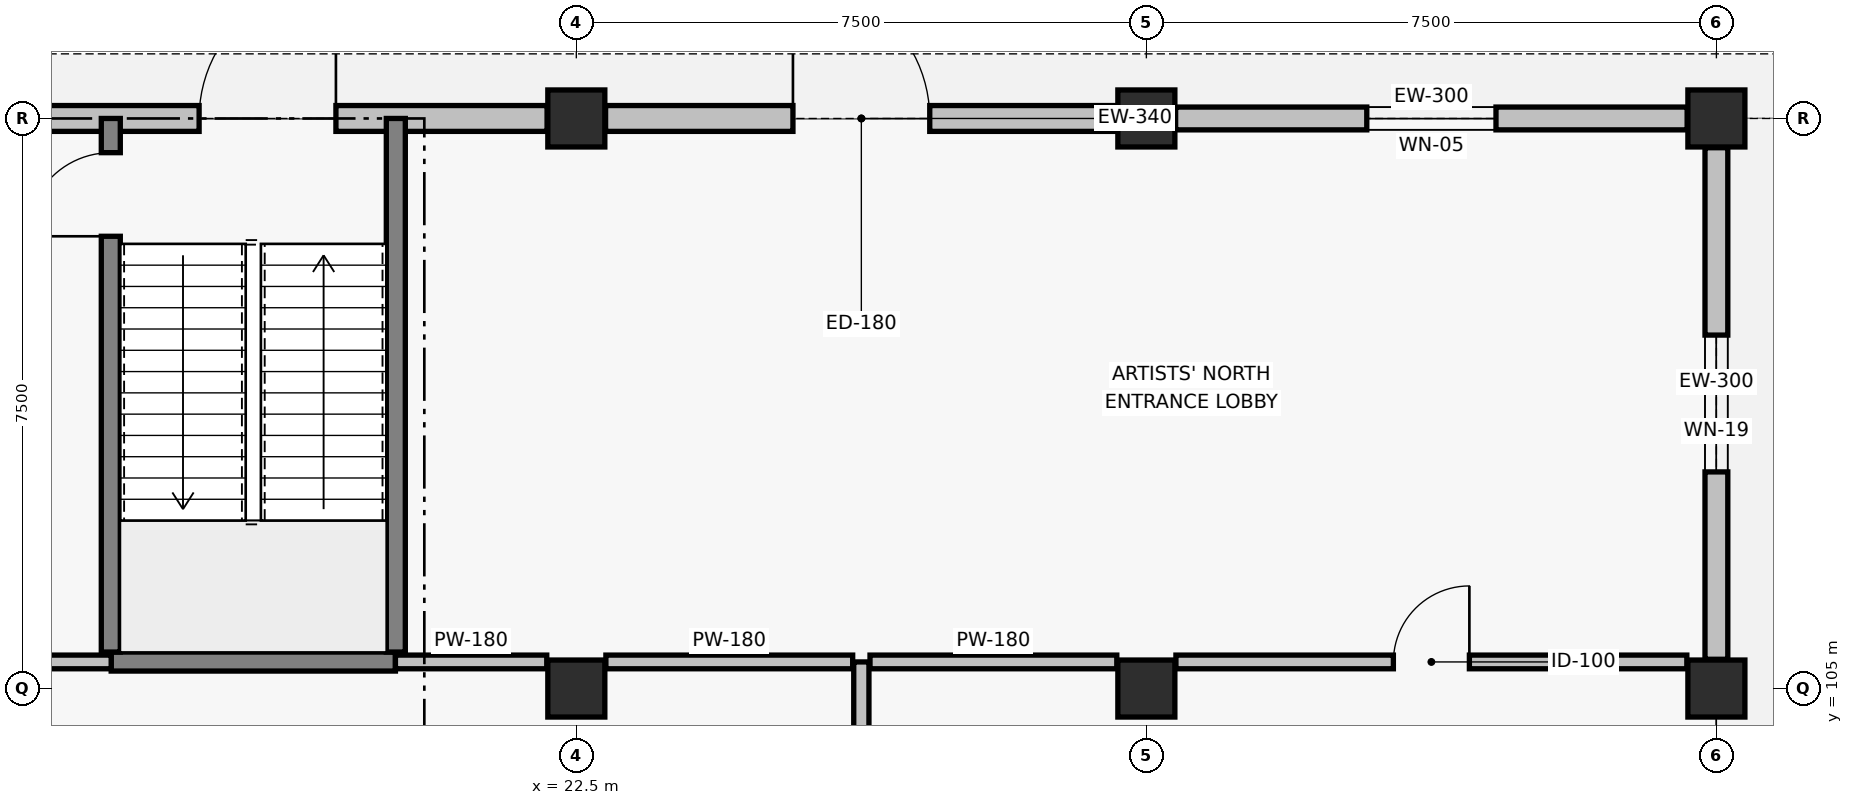
"""IFC4 building model, lengths in metres.
Left out: names, types, materials, properties, quantities, classifications, styles, units other than length and angle.
Written with IfcOpenShell. Run it as: python <this file> out.ifc"""

import sys

from ifc_helpers import new_model, si_unit, direction, frame, frame_2d, origin, origin_2d, place, context, subcontext, project, spatial, rectangle, extrude, element, fill, save


model = new_model("IFC4")
c1 = context("Model", 3, precision=1e-05, world=origin(), true_north=direction((0.0, 1.0)))
c2 = subcontext(c1, "Body", "Model", "MODEL_VIEW")
j1 = project(units=[si_unit("LENGTHUNIT", "METRE"), si_unit("PLANEANGLEUNIT", "RADIAN")], contexts=[c1])
p1 = place(None, origin())
s1 = spatial("IfcSite", under=j1, at=p1, CompositionType="ELEMENT")
p2 = place(p1, origin())
s2 = spatial("IfcBuilding", under=s1, at=p2, CompositionType="ELEMENT")
p3 = place(p2, origin())
s3 = spatial("IfcBuildingStorey", under=s2, at=p3, CompositionType="ELEMENT", Elevation=0.0)
for number, where, z_axis, x_axis in (
    (1, (22.5, 105.0, 0.0), (0.0, 0.0, 1.0), (1.0, 0.0, 0.0)),
    (2, (22.5, 112.5, 0.0), (0.0, 0.0, 1.0), (1.0, 0.0, 0.0)),
    (3, (30.0, 105.0, 0.0), (0.0, 0.0, 1.0), (1.0, 0.0, 0.0)),
    (4, (30.0, 112.5, 0.0), (0.0, 0.0, 1.0), (1.0, 0.0, 0.0)),
    (5, (37.5, 105.0, 0.0), (0.0, 0.0, 1.0), (1.0, 0.0, 0.0)),
    (6, (37.5, 112.5, 0.0), (0.0, 0.0, 1.0), (1.0, 0.0, 0.0)),
):
    element("IfcColumn", number, at=place(p3, frame(where, z_axis=z_axis, x_axis=x_axis)), inside=s3, PredefinedType="COLUMN", context=c2, shape_type="SweptSolid", body=[
        extrude(rectangle(XDim=0.75, YDim=0.75, at=origin_2d()), origin(), (0.0, 0.0, 1.0), 4.8),
    ])
p4 = place(p3, frame((15.385, 112.5, 0.0), z_axis=(0.0, 0.0, 1.0), x_axis=(1.0, 0.0, 0.0)))
e7 = element("IfcWall", 7, at=p4, inside=s3, PredefinedType="SOLIDWALL", context=c2, shape_type="SweptSolid", body=[
    extrude(rectangle(XDim=6.73, YDim=0.34, at=frame_2d((3.365, 0.0))), origin(), (0.0, 0.0, 1.0), 2.97),
])
p5 = place(p4, frame((2.152, 0.0, 0.0)))
e8 = element("IfcOpeningElement", 8, at=p5, cuts=e7, PredefinedType="OPENING", context=c2, shape_type="SweptSolid", body=[
    extrude(rectangle(XDim=1.8, YDim=2.2, at=frame_2d((0.9, 1.1))), frame((0.0, 0.18, 0.0), z_axis=(0.0, -1.0, 0.0), x_axis=(1.0, 0.0, 0.0)), (0.0, 0.0, 1.0), 0.36),
])
p6 = place(p3, frame((22.885, 112.5, 0.0), z_axis=(0.0, 0.0, 1.0), x_axis=(1.0, 0.0, 0.0)))
e9 = element("IfcWall", 9, at=p6, inside=s3, PredefinedType="SOLIDWALL", context=c2, shape_type="SweptSolid", body=[
    extrude(rectangle(XDim=6.73, YDim=0.34, at=frame_2d((3.365, 0.0))), origin(), (0.0, 0.0, 1.0), 3.72),
])
p7 = place(p6, frame((2.465, 0.0, 0.0)))
e10 = element("IfcOpeningElement", 10, at=p7, cuts=e9, PredefinedType="OPENING", context=c2, shape_type="SweptSolid", body=[
    extrude(rectangle(XDim=1.8, YDim=2.2, at=frame_2d((0.9, 1.1))), frame((0.0, 0.18, 0.0), z_axis=(0.0, -1.0, 0.0), x_axis=(1.0, 0.0, 0.0)), (0.0, 0.0, 1.0), 0.36),
])
p8 = place(p3, frame((30.385, 112.5, 0.0), z_axis=(0.0, 0.0, 1.0), x_axis=(1.0, 0.0, 0.0)))
e11 = element("IfcWall", 11, at=p8, inside=s3, PredefinedType="SOLIDWALL", context=c2, shape_type="SweptSolid", body=[
    extrude(rectangle(XDim=6.73, YDim=0.3, at=frame_2d((3.365, 0.0))), origin(), (0.0, 0.0, 1.0), 3.72),
])
p9 = place(p8, frame((2.515, 0.0, 0.6)))
e12 = element("IfcOpeningElement", 12, at=p9, cuts=e11, PredefinedType="OPENING", context=c2, shape_type="SweptSolid", body=[
    extrude(rectangle(XDim=1.7, YDim=1.8, at=frame_2d((0.85, 0.9))), frame((0.0, 0.16, 0.0), z_axis=(0.0, -1.0, 0.0), x_axis=(1.0, 0.0, 0.0)), (0.0, 0.0, 1.0), 0.32),
])
p10 = place(p3, frame((37.5, 105.385, 0.0), z_axis=(0.0, 0.0, 1.0), x_axis=(0.0, 1.0, 0.0)))
e13 = element("IfcWall", 13, at=p10, inside=s3, PredefinedType="SOLIDWALL", context=c2, shape_type="SweptSolid", body=[
    extrude(rectangle(XDim=6.73, YDim=0.3, at=frame_2d((3.365, 0.0))), origin(), (0.0, 0.0, 1.0), 3.67),
])
p11 = place(p10, frame((2.465, 0.0, 0.6)))
e14 = element("IfcOpeningElement", 14, at=p11, cuts=e13, PredefinedType="OPENING", context=c2, shape_type="SweptSolid", body=[
    extrude(rectangle(XDim=1.8, YDim=1.2, at=frame_2d((0.9, 0.6))), frame((0.0, 0.16, 0.0), z_axis=(0.0, -1.0, 0.0), x_axis=(1.0, 0.0, 0.0)), (0.0, 0.0, 1.0), 0.32),
])
p12 = place(p3, frame((16.38, 105.355, 0.0), z_axis=(0.0, 0.0, 1.0), x_axis=(1.0, 0.0, 0.0)))
e15 = element("IfcWall", 15, at=p12, inside=s3, PredefinedType="SOLIDWALL", context=c2, shape_type="SweptSolid", body=[
    extrude(rectangle(XDim=3.74, YDim=0.25, at=frame_2d((1.87, 0.0))), origin(), (0.0, 0.0, 1.0), 4.5),
])
p13 = place(p3, frame((16.375, 105.48, 0.0), z_axis=(0.0, 0.0, 1.0), x_axis=(0.0, 1.0, 0.0)))
e16 = element("IfcWall", 16, at=p13, inside=s3, PredefinedType="SOLIDWALL", context=c2, shape_type="SweptSolid", body=[
    extrude(rectangle(XDim=7.02, YDim=0.25, at=frame_2d((3.51, 0.0))), origin(), (0.0, 0.0, 1.0), 4.5),
])
p14 = place(p13, frame((5.47, 0.0, 0.0)))
e17 = element("IfcOpeningElement", 17, at=p14, cuts=e16, PredefinedType="OPENING", context=c2, shape_type="SweptSolid", body=[
    extrude(rectangle(XDim=1.1, YDim=2.15, at=frame_2d((0.55, 1.075))), frame((0.0, 0.135, 0.0), z_axis=(0.0, -1.0, 0.0), x_axis=(1.0, 0.0, 0.0)), (0.0, 0.0, 1.0), 0.27),
])
p15 = place(p3, frame((20.125, 105.48, 0.0), z_axis=(0.0, 0.0, 1.0), x_axis=(0.0, 1.0, 0.0)))
e18 = element("IfcWall", 18, at=p15, inside=s3, PredefinedType="SOLIDWALL", context=c2, shape_type="SweptSolid", body=[
    extrude(rectangle(XDim=7.02, YDim=0.25, at=frame_2d((3.51, 0.0))), origin(), (0.0, 0.0, 1.0), 4.5),
])
p16 = place(p3, frame((15.389, 105.35, 0.0), z_axis=(0.0, 0.0, 1.0), x_axis=(1.0, 0.0, 0.0)))
e19 = element("IfcWall", 19, at=p16, inside=s3, PredefinedType="PARTITIONING", context=c2, shape_type="SweptSolid", body=[
    extrude(rectangle(XDim=0.991, YDim=0.18, at=frame_2d((0.496, 0.0))), origin(), (0.0, 0.0, 1.0), 2.97),
])
p17 = place(p3, frame((26.25, 90.114, 0.0), z_axis=(0.0, 0.0, 1.0), x_axis=(0.0, 1.0, 0.0)))
e20 = element("IfcWall", 20, at=p17, inside=s3, PredefinedType="PARTITIONING", context=c2, shape_type="SweptSolid", body=[
    extrude(rectangle(XDim=15.236, YDim=0.2, at=frame_2d((7.618, 0.0))), origin(), (0.0, 0.0, 1.0), 3.42),
])
p18 = place(p3, frame((20.12, 105.35, 0.0), z_axis=(0.0, 0.0, 1.0), x_axis=(1.0, 0.0, 0.0)))
e21 = element("IfcWall", 21, at=p18, inside=s3, PredefinedType="PARTITIONING", context=c2, shape_type="SweptSolid", body=[
    extrude(rectangle(XDim=1.991, YDim=0.18, at=frame_2d((0.996, 0.0))), origin(), (0.0, 0.0, 1.0), 3.42),
])
p19 = place(p3, frame((22.889, 105.35, 0.0), z_axis=(0.0, 0.0, 1.0), x_axis=(1.0, 0.0, 0.0)))
e22 = element("IfcWall", 22, at=p19, inside=s3, PredefinedType="PARTITIONING", context=c2, shape_type="SweptSolid", body=[
    extrude(rectangle(XDim=3.247, YDim=0.18, at=frame_2d((1.624, 0.0))), origin(), (0.0, 0.0, 1.0), 3.42),
])
p20 = place(p3, frame((26.364, 105.35, 0.0), z_axis=(0.0, 0.0, 1.0), x_axis=(1.0, 0.0, 0.0)))
e23 = element("IfcWall", 23, at=p20, inside=s3, PredefinedType="PARTITIONING", context=c2, shape_type="SweptSolid", body=[
    extrude(rectangle(XDim=3.247, YDim=0.18, at=frame_2d((1.624, 0.0))), origin(), (0.0, 0.0, 1.0), 3.62),
])
p21 = place(p3, frame((30.389, 105.35, 0.0), z_axis=(0.0, 0.0, 1.0), x_axis=(1.0, 0.0, 0.0)))
e24 = element("IfcWall", 24, at=p21, inside=s3, PredefinedType="PARTITIONING", context=c2, shape_type="SweptSolid", body=[
    extrude(rectangle(XDim=6.722, YDim=0.18, at=frame_2d((3.361, 0.0))), origin(), (0.0, 0.0, 1.0), 3.62),
])
p22 = place(p21, frame((2.861, 0.0, 0.0)))
e25 = element("IfcOpeningElement", 25, at=p22, cuts=e24, PredefinedType="OPENING", context=c2, shape_type="SweptSolid", body=[
    extrude(rectangle(XDim=1.0, YDim=2.12, at=frame_2d((0.5, 1.06))), frame((0.0, 0.1, 0.0), z_axis=(0.0, -1.0, 0.0), x_axis=(1.0, 0.0, 0.0)), (0.0, 0.0, 1.0), 0.2),
])
p23 = place(p5, origin())
e26 = element("IfcDoor", 26, at=p23, inside=s3, OperationType="SINGLE_SWING_RIGHT", PredefinedType="DOOR", context=c2, shape_type="SweptSolid", body=[
    extrude(rectangle(XDim=1.8, YDim=2.2, at=frame_2d((0.9, 1.1))), frame((0.0, 0.025, 0.0), z_axis=(0.0, -1.0, 0.0), x_axis=(1.0, 0.0, 0.0)), (0.0, 0.0, 1.0), 0.05),
])
fill(e8, e26)
p24 = place(p7, origin())
e27 = element("IfcDoor", 27, at=p24, inside=s3, OperationType="SINGLE_SWING_LEFT", PredefinedType="DOOR", context=c2, shape_type="SweptSolid", body=[
    extrude(rectangle(XDim=1.8, YDim=2.2, at=frame_2d((0.9, 1.1))), frame((0.0, 0.025, 0.0), z_axis=(0.0, -1.0, 0.0), x_axis=(1.0, 0.0, 0.0)), (0.0, 0.0, 1.0), 0.05),
])
fill(e10, e27)
p25 = place(p9, origin())
e28 = element("IfcWindow", 28, at=p25, inside=s3, PartitioningType="SINGLE_PANEL", PredefinedType="WINDOW", context=c2, shape_type="SweptSolid", body=[
    extrude(rectangle(XDim=1.7, YDim=1.8, at=frame_2d((0.85, 0.9))), frame((0.0, 0.03, 0.0), z_axis=(0.0, -1.0, 0.0), x_axis=(1.0, 0.0, 0.0)), (0.0, 0.0, 1.0), 0.06),
])
fill(e12, e28)
p26 = place(p11, origin())
e29 = element("IfcWindow", 29, at=p26, inside=s3, PartitioningType="SINGLE_PANEL", PredefinedType="WINDOW", context=c2, shape_type="SweptSolid", body=[
    extrude(rectangle(XDim=1.8, YDim=1.2, at=frame_2d((0.9, 0.6))), frame((0.0, 0.03, 0.0), z_axis=(0.0, -1.0, 0.0), x_axis=(1.0, 0.0, 0.0)), (0.0, 0.0, 1.0), 0.06),
])
fill(e14, e29)
p27 = place(p14, origin())
e30 = element("IfcDoor", 30, at=p27, inside=s3, OperationType="SINGLE_SWING_LEFT", PredefinedType="DOOR", context=c2, shape_type="SweptSolid", body=[
    extrude(rectangle(XDim=1.1, YDim=2.15, at=frame_2d((0.55, 1.075))), frame((0.0, 0.025, 0.0), z_axis=(0.0, -1.0, 0.0), x_axis=(1.0, 0.0, 0.0)), (0.0, 0.0, 1.0), 0.05),
])
fill(e17, e30)
p28 = place(p22, origin())
e31 = element("IfcDoor", 31, at=p28, inside=s3, OperationType="SINGLE_SWING_RIGHT", PredefinedType="DOOR", context=c2, shape_type="SweptSolid", body=[
    extrude(rectangle(XDim=1.0, YDim=2.12, at=frame_2d((0.5, 1.06))), frame((0.0, 0.025, 0.0), z_axis=(0.0, -1.0, 0.0), x_axis=(1.0, 0.0, 0.0)), (0.0, 0.0, 1.0), 0.05),
])
fill(e25, e31)
save(model, sys.argv[1])
